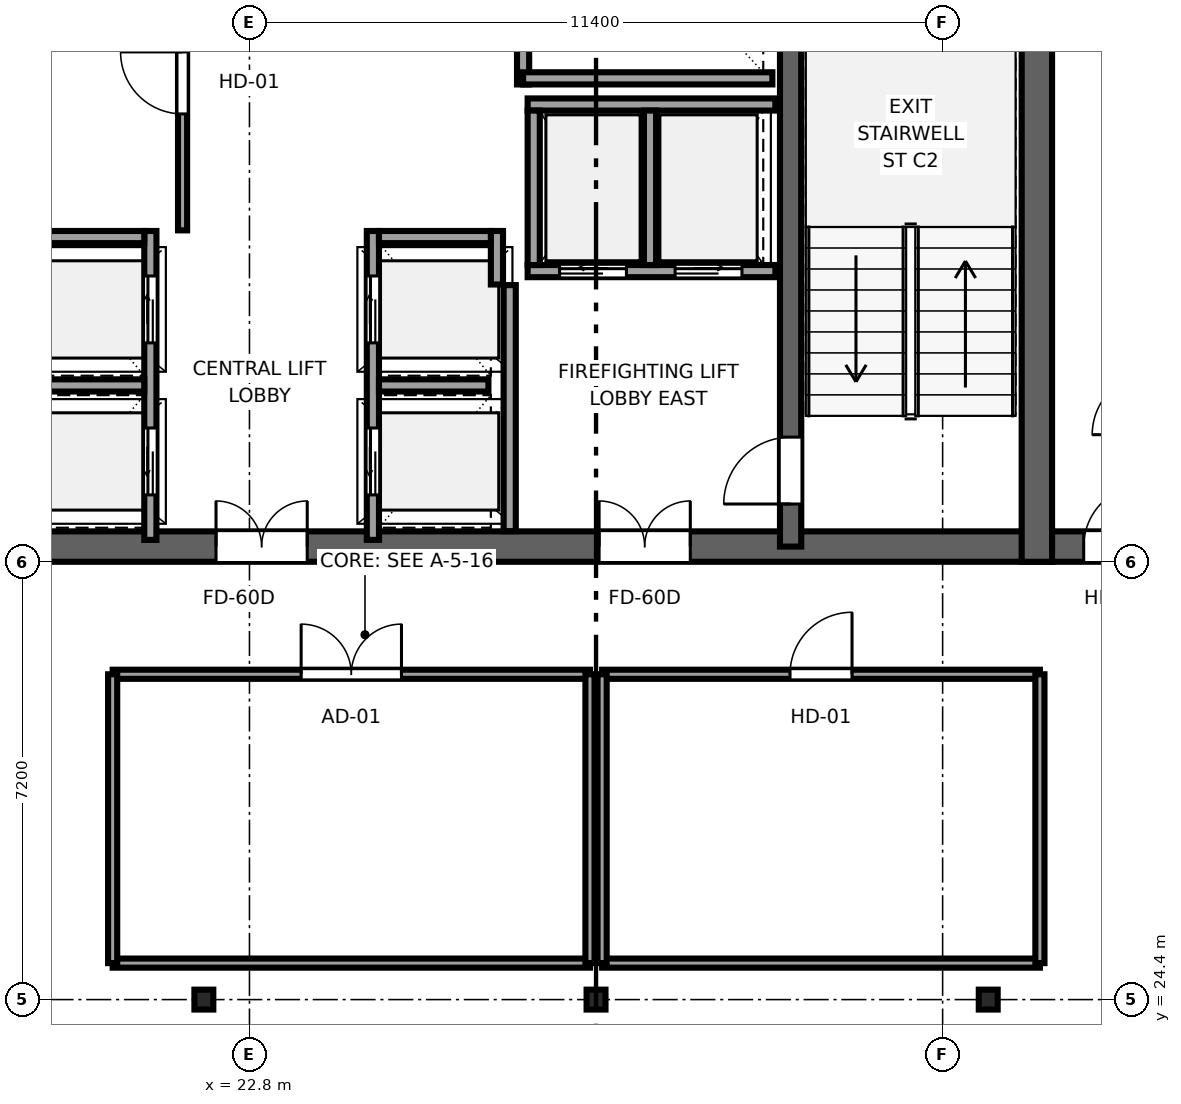
"""IFC4 building model, lengths in metres.
Left out: names, types, materials, properties, quantities, classifications, styles, units other than length and angle.
Written with IfcOpenShell. Run it as: python <this file> out.ifc"""

import sys

from ifc_helpers import new_model, si_unit, direction, frame, frame_2d, origin, origin_2d, place, context, subcontext, project, spatial, rectangle, i_section, extrude, source, transform, mapped, element, fill, save


model = new_model("IFC4")
c1 = context("Model", 3, precision=1e-05, world=origin(), true_north=direction((0.0, 1.0)))
c2 = subcontext(c1, "Body", "Model", "MODEL_VIEW")
j1 = project(units=[si_unit("LENGTHUNIT", "METRE"), si_unit("PLANEANGLEUNIT", "RADIAN")], contexts=[c1])
p1 = place(None, origin())
s1 = spatial("IfcSite", under=j1, at=p1, CompositionType="ELEMENT")
p2 = place(p1, origin())
s2 = spatial("IfcBuilding", under=s1, at=p2, CompositionType="ELEMENT")
p3 = place(p2, frame((0.0, 0.0, 231.0)))
s3 = spatial("IfcBuildingStorey", under=s2, at=p3, CompositionType="ELEMENT", Elevation=231.0)
p4 = place(p3, frame((10.0, 31.85, 0.0), z_axis=(0.0, 0.0, 1.0), x_axis=(1.0, 0.0, 0.0)))
e1 = element("IfcWall", 1, at=p4, inside=s3, PredefinedType="SHEAR", context=c2, shape_type="SweptSolid", body=[
    extrude(rectangle(XDim=26.0, YDim=0.5, at=frame_2d((13.0, 0.0))), origin(), (0.0, 0.0, 1.0), 3.55),
])
p5 = place(p4, frame((7.45, 0.0, 0.0), z_axis=(0.0, 0.0, 1.0), x_axis=(-1.0, 0.0, 0.0)))
e2 = element("IfcOpeningElement", 2, at=p5, cuts=e1, PredefinedType="OPENING", context=c2, shape_type="SweptSolid", body=[
    extrude(rectangle(XDim=1.5, YDim=2.04, at=frame_2d((0.75, 1.02))), frame((0.0, 0.26, 0.0), z_axis=(0.0, -1.0, 0.0), x_axis=(1.0, 0.0, 0.0)), (0.0, 0.0, 1.0), 0.52),
])
p6 = place(p4, frame((13.75, 0.0, 0.0), z_axis=(0.0, 0.0, 1.0), x_axis=(-1.0, 0.0, 0.0)))
e3 = element("IfcOpeningElement", 3, at=p6, cuts=e1, PredefinedType="OPENING", context=c2, shape_type="SweptSolid", body=[
    extrude(rectangle(XDim=1.5, YDim=2.04, at=frame_2d((0.75, 1.02))), frame((0.0, 0.26, 0.0), z_axis=(0.0, -1.0, 0.0), x_axis=(1.0, 0.0, 0.0)), (0.0, 0.0, 1.0), 0.52),
])
p7 = place(p4, frame((20.05, 0.0, 0.0), z_axis=(0.0, 0.0, 1.0), x_axis=(-1.0, 0.0, 0.0)))
e4 = element("IfcOpeningElement", 4, at=p7, cuts=e1, PredefinedType="OPENING", context=c2, shape_type="SweptSolid", body=[
    extrude(rectangle(XDim=1.5, YDim=2.04, at=frame_2d((0.75, 1.02))), frame((0.0, 0.26, 0.0), z_axis=(0.0, -1.0, 0.0), x_axis=(1.0, 0.0, 0.0)), (0.0, 0.0, 1.0), 0.52),
])
p8 = place(p3, frame((35.75, 31.6, 0.0), z_axis=(0.0, 0.0, 1.0), x_axis=(0.0, 1.0, 0.0)))
e5 = element("IfcWall", 5, at=p8, inside=s3, PredefinedType="SHEAR", context=c2, shape_type="SweptSolid", body=[
    extrude(rectangle(XDim=13.6, YDim=0.5, at=frame_2d((6.8, 0.0))), origin(), (0.0, 0.0, 1.0), 3.55),
])
p9 = place(p3, frame((31.7, 31.85, 0.0), z_axis=(0.0, 0.0, 1.0), x_axis=(0.0, 1.0, 0.0)))
e6 = element("IfcWall", 6, at=p9, inside=s3, PredefinedType="SHEAR", context=c2, shape_type="SweptSolid", body=[
    extrude(rectangle(XDim=13.1, YDim=0.35, at=frame_2d((6.55, 0.0))), origin(), (0.0, 0.0, 1.0), 3.55),
])
p10 = place(p9, frame((1.8, 0.0, 0.0), z_axis=(0.0, 0.0, 1.0), x_axis=(-1.0, 0.0, 0.0)))
e7 = element("IfcOpeningElement", 7, at=p10, cuts=e6, PredefinedType="OPENING", context=c2, shape_type="SweptSolid", body=[
    extrude(rectangle(XDim=1.1, YDim=2.12, at=frame_2d((0.55, 1.06))), frame((0.0, 0.185, 0.0), z_axis=(0.0, -1.0, 0.0), x_axis=(1.0, 0.0, 0.0)), (0.0, 0.0, 1.0), 0.37),
])
p11 = place(p3, frame((36.0, 31.85, 0.0), z_axis=(0.0, 0.0, 1.0), x_axis=(1.0, 0.0, 0.0)))
e8 = element("IfcWall", 8, at=p11, inside=s3, PredefinedType="SHEAR", context=c2, shape_type="SweptSolid", body=[
    extrude(rectangle(XDim=3.8, YDim=0.5, at=frame_2d((1.9, 0.0))), origin(), (0.0, 0.0, 1.0), 3.55),
])
p12 = place(p11, frame((1.54, 0.0, 0.0), z_axis=(0.0, 0.0, 1.0), x_axis=(-1.0, 0.0, 0.0)))
e9 = element("IfcOpeningElement", 9, at=p12, cuts=e8, PredefinedType="OPENING", context=c2, shape_type="SweptSolid", body=[
    extrude(rectangle(XDim=1.02, YDim=2.03, at=frame_2d((0.51, 1.015))), frame((0.0, 0.26, 0.0), z_axis=(0.0, -1.0, 0.0), x_axis=(1.0, 0.0, 0.0)), (0.0, 0.0, 1.0), 0.52),
])
m1 = source(origin(), c2, "Body", "SweptSolid", [
    extrude(i_section(OverallWidth=0.311, OverallDepth=0.327, WebThickness=0.016, FlangeThickness=0.025, FilletRadius=0.017, at=origin_2d()), origin(), (0.0, 0.0, 1.0), 3.55),
])
for number, where, z_axis, x_axis in (
    (10, (22.05, 24.4, 0.0), (0.0, 0.0, 1.0), (1.0, 0.0, 0.0)),
    (11, (28.5, 24.4, 0.0), (0.0, 0.0, 1.0), (1.0, 0.0, 0.0)),
    (12, (34.95, 24.4, 0.0), (0.0, 0.0, 1.0), (1.0, 0.0, 0.0)),
):
    element("IfcColumn", number, at=place(p3, frame(where, z_axis=z_axis, x_axis=x_axis)), inside=s3, PredefinedType="COLUMN", context=c2, shape_type="MappedRepresentation", body=[
        mapped(m1, transform((0.0, 0.0, 0.0), x_axis=(1.0, 0.0, 0.0), y_axis=(0.0, 1.0, 0.0), z_axis=(0.0, 0.0, 1.0), scale=1.0)),
    ])
p13 = place(p3, frame((27.3, 39.45, 0.0), z_axis=(0.0, 0.0, 1.0), x_axis=(0.0, 1.0, 0.0)))
e13 = element("IfcWall", 13, at=p13, inside=s3, PredefinedType="SOLIDWALL", context=c2, shape_type="SweptSolid", body=[
    extrude(rectangle(XDim=4.4, YDim=0.2, at=frame_2d((2.2, 0.0))), origin(), (0.0, 0.0, 1.0), 3.37),
])
p14 = place(p3, frame((27.3, 39.55, 0.0), z_axis=(0.0, 0.0, 1.0), x_axis=(1.0, 0.0, 0.0)))
e14 = element("IfcWall", 14, at=p14, inside=s3, PredefinedType="SOLIDWALL", context=c2, shape_type="SweptSolid", body=[
    extrude(rectangle(XDim=4.1, YDim=0.2, at=frame_2d((2.05, 0.0))), origin(), (0.0, 0.0, 1.0), 3.37),
])
p15 = place(p3, frame((27.08, 32.104, 0.0), z_axis=(0.0, 0.0, 1.0), x_axis=(0.0, 1.0, 0.0)))
e15 = element("IfcWall", 15, at=p15, inside=s3, PredefinedType="SOLIDWALL", context=c2, shape_type="SweptSolid", body=[
    extrude(rectangle(XDim=4.046, YDim=0.2, at=frame_2d((2.023, 0.0))), origin(), (0.0, 0.0, 1.0), 3.37),
])
p16 = place(p3, frame((21.17, 31.96, 0.0), z_axis=(0.0, 0.0, 1.0), x_axis=(0.0, 1.0, 0.0)))
e16 = element("IfcWall", 16, at=p16, inside=s3, PredefinedType="SOLIDWALL", context=c2, shape_type="SweptSolid", body=[
    extrude(rectangle(XDim=5.08, YDim=0.2, at=frame_2d((2.54, 0.0))), origin(), (0.0, 0.0, 1.0), 3.37),
])
p17 = place(p16, frame((0.74, 0.0, 0.0)))
e17 = element("IfcOpeningElement", 17, at=p17, cuts=e16, PredefinedType="OPENING", context=c2, shape_type="SweptSolid", body=[
    extrude(rectangle(XDim=1.1, YDim=2.12, at=frame_2d((0.55, 1.06))), frame((0.0, 0.11, 0.0), z_axis=(0.0, -1.0, 0.0), x_axis=(1.0, 0.0, 0.0)), (0.0, 0.0, 1.0), 0.22),
])
p18 = place(p16, frame((3.24, 0.0, 0.0)))
e18 = element("IfcOpeningElement", 18, at=p18, cuts=e16, PredefinedType="OPENING", context=c2, shape_type="SweptSolid", body=[
    extrude(rectangle(XDim=1.1, YDim=2.12, at=frame_2d((0.55, 1.06))), frame((0.0, 0.11, 0.0), z_axis=(0.0, -1.0, 0.0), x_axis=(1.0, 0.0, 0.0)), (0.0, 0.0, 1.0), 0.22),
])
p19 = place(p3, frame((19.23, 36.94, 0.0), z_axis=(0.0, 0.0, 1.0), x_axis=(1.0, 0.0, 0.0)))
e19 = element("IfcWall", 19, at=p19, inside=s3, PredefinedType="SOLIDWALL", context=c2, shape_type="SweptSolid", body=[
    extrude(rectangle(XDim=1.84, YDim=0.2, at=frame_2d((0.92, 0.0))), origin(), (0.0, 0.0, 1.0), 3.37),
])
p20 = place(p3, frame((19.27, 34.5, 0.0), z_axis=(0.0, 0.0, 1.0), x_axis=(1.0, 0.0, 0.0)))
e20 = element("IfcWall", 20, at=p20, inside=s3, PredefinedType="SOLIDWALL", context=c2, shape_type="SweptSolid", body=[
    extrude(rectangle(XDim=1.8, YDim=0.2, at=frame_2d((0.9, 0.0))), origin(), (0.0, 0.0, 1.0), 3.37),
])
p21 = place(p3, frame((27.375, 36.38, 0.0), z_axis=(0.0, 0.0, 1.0), x_axis=(1.0, 0.0, 0.0)))
e21 = element("IfcWall", 21, at=p21, inside=s3, PredefinedType="SOLIDWALL", context=c2, shape_type="SweptSolid", body=[
    extrude(rectangle(XDim=4.075, YDim=0.2, at=frame_2d((2.038, 0.0))), origin(), (0.0, 0.0, 1.0), 3.37),
])
p22 = place(p21, frame((0.525, 0.0, 0.0)))
e22 = element("IfcOpeningElement", 22, at=p22, cuts=e21, PredefinedType="OPENING", context=c2, shape_type="SweptSolid", body=[
    extrude(rectangle(XDim=1.1, YDim=2.12, at=frame_2d((0.55, 1.06))), frame((0.0, 0.11, 0.0), z_axis=(0.0, -1.0, 0.0), x_axis=(1.0, 0.0, 0.0)), (0.0, 0.0, 1.0), 0.22),
])
p23 = place(p21, frame((2.425, 0.0, 0.0)))
e23 = element("IfcOpeningElement", 23, at=p23, cuts=e21, PredefinedType="OPENING", context=c2, shape_type="SweptSolid", body=[
    extrude(rectangle(XDim=1.1, YDim=2.12, at=frame_2d((0.55, 1.06))), frame((0.0, 0.11, 0.0), z_axis=(0.0, -1.0, 0.0), x_axis=(1.0, 0.0, 0.0)), (0.0, 0.0, 1.0), 0.22),
])
p24 = place(p3, frame((27.375, 39.12, 0.0), z_axis=(0.0, 0.0, 1.0), x_axis=(1.0, 0.0, 0.0)))
e24 = element("IfcWall", 24, at=p24, inside=s3, PredefinedType="SOLIDWALL", context=c2, shape_type="SweptSolid", body=[
    extrude(rectangle(XDim=4.075, YDim=0.2, at=frame_2d((2.038, 0.0))), origin(), (0.0, 0.0, 1.0), 3.37),
])
for number, where, z_axis, x_axis in (
    (25, (27.475, 36.48, 0.0), (0.0, 0.0, 1.0), (0.0, 1.0, 0.0)),
    (26, (29.387, 36.48, 0.0), (0.0, 0.0, 1.0), (0.0, 1.0, 0.0)),
):
    element("IfcWall", number, at=place(p3, frame(where, z_axis=z_axis, x_axis=x_axis)), inside=s3, PredefinedType="SOLIDWALL", context=c2, shape_type="SweptSolid", body=[
        extrude(rectangle(XDim=2.54, YDim=0.2, at=frame_2d((1.27, 0.0))), origin(), (0.0, 0.0, 1.0), 3.37),
    ])
p25 = place(p3, frame((24.83, 31.96, 0.0), z_axis=(0.0, 0.0, 1.0), x_axis=(0.0, 1.0, 0.0)))
e27 = element("IfcWall", 27, at=p25, inside=s3, PredefinedType="SOLIDWALL", context=c2, shape_type="SweptSolid", body=[
    extrude(rectangle(XDim=5.08, YDim=0.2, at=frame_2d((2.54, 0.0))), origin(), (0.0, 0.0, 1.0), 3.37),
])
p26 = place(p25, frame((0.74, 0.0, 0.0)))
e28 = element("IfcOpeningElement", 28, at=p26, cuts=e27, PredefinedType="OPENING", context=c2, shape_type="SweptSolid", body=[
    extrude(rectangle(XDim=1.1, YDim=2.12, at=frame_2d((0.55, 1.06))), frame((0.0, 0.11, 0.0), z_axis=(0.0, -1.0, 0.0), x_axis=(1.0, 0.0, 0.0)), (0.0, 0.0, 1.0), 0.22),
])
p27 = place(p25, frame((3.24, 0.0, 0.0)))
e29 = element("IfcOpeningElement", 29, at=p27, cuts=e27, PredefinedType="OPENING", context=c2, shape_type="SweptSolid", body=[
    extrude(rectangle(XDim=1.1, YDim=2.12, at=frame_2d((0.55, 1.06))), frame((0.0, 0.11, 0.0), z_axis=(0.0, -1.0, 0.0), x_axis=(1.0, 0.0, 0.0)), (0.0, 0.0, 1.0), 0.22),
])
p28 = place(p3, frame((26.87, 36.16, 0.0), z_axis=(0.0, 0.0, 1.0), x_axis=(0.0, 1.0, 0.0)))
e30 = element("IfcWall", 30, at=p28, inside=s3, PredefinedType="SOLIDWALL", context=c2, shape_type="SweptSolid", body=[
    extrude(rectangle(XDim=0.88, YDim=0.2, at=frame_2d((0.44, 0.0))), origin(), (0.0, 0.0, 1.0), 3.37),
])
p29 = place(p3, frame((24.93, 36.94, 0.0), z_axis=(0.0, 0.0, 1.0), x_axis=(1.0, 0.0, 0.0)))
e31 = element("IfcWall", 31, at=p29, inside=s3, PredefinedType="SOLIDWALL", context=c2, shape_type="SweptSolid", body=[
    extrude(rectangle(XDim=1.84, YDim=0.2, at=frame_2d((0.92, 0.0))), origin(), (0.0, 0.0, 1.0), 3.37),
])
p30 = place(p3, frame((24.93, 34.5, 0.0), z_axis=(0.0, 0.0, 1.0), x_axis=(1.0, 0.0, 0.0)))
e32 = element("IfcWall", 32, at=p30, inside=s3, PredefinedType="SOLIDWALL", context=c2, shape_type="SweptSolid", body=[
    extrude(rectangle(XDim=1.8, YDim=0.2, at=frame_2d((0.9, 0.0))), origin(), (0.0, 0.0, 1.0), 3.37),
])
p31 = place(p3, frame((21.7, 37.05, 0.0), z_axis=(0.0, 0.0, 1.0), x_axis=(0.0, 1.0, 0.0)))
e33 = element("IfcWall", 33, at=p31, inside=s3, PredefinedType="PARTITIONING", context=c2, shape_type="SweptSolid", body=[
    extrude(rectangle(XDim=4.85, YDim=0.15, at=frame_2d((2.425, 0.0))), origin(), (0.0, 0.0, 1.0), 3.37),
])
p32 = place(p31, frame((1.915, 0.0, 0.0)))
e34 = element("IfcOpeningElement", 34, at=p32, cuts=e33, PredefinedType="OPENING", context=c2, shape_type="SweptSolid", body=[
    extrude(rectangle(XDim=1.02, YDim=2.03, at=frame_2d((0.51, 1.015))), frame((0.0, 0.085, 0.0), z_axis=(0.0, -1.0, 0.0), x_axis=(1.0, 0.0, 0.0)), (0.0, 0.0, 1.0), 0.17),
])
p33 = place(p3, frame((20.55, 25.0, 0.0), z_axis=(0.0, 0.0, 1.0), x_axis=(1.0, 0.0, 0.0)))
e35 = element("IfcWall", 35, at=p33, inside=s3, PredefinedType="PARTITIONING", context=c2, shape_type="SweptSolid", body=[
    extrude(rectangle(XDim=7.85, YDim=0.15, at=frame_2d((3.925, 0.0))), origin(), (0.0, 0.0, 1.0), 3.37),
])
p34 = place(p3, frame((20.55, 29.75, 0.0), z_axis=(0.0, 0.0, 1.0), x_axis=(1.0, 0.0, 0.0)))
e36 = element("IfcWall", 36, at=p34, inside=s3, PredefinedType="PARTITIONING", context=c2, shape_type="SweptSolid", body=[
    extrude(rectangle(XDim=7.85, YDim=0.15, at=frame_2d((3.925, 0.0))), origin(), (0.0, 0.0, 1.0), 3.37),
])
p35 = place(p34, frame((3.1, 0.0, 0.0)))
e37 = element("IfcOpeningElement", 37, at=p35, cuts=e36, PredefinedType="OPENING", context=c2, shape_type="SweptSolid", body=[
    extrude(rectangle(XDim=1.65, YDim=2.15, at=frame_2d((0.825, 1.075))), frame((0.0, 0.085, 0.0), z_axis=(0.0, -1.0, 0.0), x_axis=(1.0, 0.0, 0.0)), (0.0, 0.0, 1.0), 0.17),
])
p36 = place(p3, frame((20.55, 25.0, 0.0), z_axis=(0.0, 0.0, 1.0), x_axis=(0.0, 1.0, 0.0)))
e38 = element("IfcWall", 38, at=p36, inside=s3, PredefinedType="PARTITIONING", context=c2, shape_type="SweptSolid", body=[
    extrude(rectangle(XDim=4.75, YDim=0.15, at=frame_2d((2.375, 0.0))), origin(), (0.0, 0.0, 1.0), 3.37),
])
p37 = place(p3, frame((28.4, 25.0, 0.0), z_axis=(0.0, 0.0, 1.0), x_axis=(0.0, 1.0, 0.0)))
e39 = element("IfcWall", 39, at=p37, inside=s3, PredefinedType="PARTITIONING", context=c2, shape_type="SweptSolid", body=[
    extrude(rectangle(XDim=4.75, YDim=0.15, at=frame_2d((2.375, 0.0))), origin(), (0.0, 0.0, 1.0), 2.758),
])
p38 = place(p3, frame((28.6, 25.0, 0.0), z_axis=(0.0, 0.0, 1.0), x_axis=(1.0, 0.0, 0.0)))
e40 = element("IfcWall", 40, at=p38, inside=s3, PredefinedType="PARTITIONING", context=c2, shape_type="SweptSolid", body=[
    extrude(rectangle(XDim=7.2, YDim=0.15, at=frame_2d((3.6, 0.0))), origin(), (0.0, 0.0, 1.0), 3.37),
])
p39 = place(p3, frame((28.6, 29.75, 0.0), z_axis=(0.0, 0.0, 1.0), x_axis=(1.0, 0.0, 0.0)))
e41 = element("IfcWall", 41, at=p39, inside=s3, PredefinedType="PARTITIONING", context=c2, shape_type="SweptSolid", body=[
    extrude(rectangle(XDim=7.2, YDim=0.15, at=frame_2d((3.6, 0.0))), origin(), (0.0, 0.0, 1.0), 3.37),
])
p40 = place(p39, frame((3.09, 0.0, 0.0)))
e42 = element("IfcOpeningElement", 42, at=p40, cuts=e41, PredefinedType="OPENING", context=c2, shape_type="SweptSolid", body=[
    extrude(rectangle(XDim=1.02, YDim=2.03, at=frame_2d((0.51, 1.015))), frame((0.0, 0.085, 0.0), z_axis=(0.0, -1.0, 0.0), x_axis=(1.0, 0.0, 0.0)), (0.0, 0.0, 1.0), 0.17),
])
p41 = place(p3, frame((28.6, 25.0, 0.0), z_axis=(0.0, 0.0, 1.0), x_axis=(0.0, 1.0, 0.0)))
e43 = element("IfcWall", 43, at=p41, inside=s3, PredefinedType="PARTITIONING", context=c2, shape_type="SweptSolid", body=[
    extrude(rectangle(XDim=4.75, YDim=0.15, at=frame_2d((2.375, 0.0))), origin(), (0.0, 0.0, 1.0), 2.758),
])
p42 = place(p3, frame((35.8, 25.0, 0.0), z_axis=(0.0, 0.0, 1.0), x_axis=(0.0, 1.0, 0.0)))
e44 = element("IfcWall", 44, at=p42, inside=s3, PredefinedType="PARTITIONING", context=c2, shape_type="SweptSolid", body=[
    extrude(rectangle(XDim=4.75, YDim=0.15, at=frame_2d((2.375, 0.0))), origin(), (0.0, 0.0, 1.0), 3.37),
])
m2 = source(origin(), c2, "Body", "SweptSolid", [
    extrude(rectangle(XDim=1.1, YDim=2.12, at=frame_2d((0.55, 1.06))), frame((0.0, 0.025, 0.0), z_axis=(0.0, -1.0, 0.0), x_axis=(1.0, 0.0, 0.0)), (0.0, 0.0, 1.0), 0.05),
])
p43 = place(p10, origin())
e45 = element("IfcDoor", 45, at=p43, inside=s3, OperationType="SINGLE_SWING_LEFT", PredefinedType="DOOR", context=c2, shape_type="MappedRepresentation", body=[
    mapped(m2, transform((0.0, 0.0, 0.0), x_axis=(1.0, 0.0, 0.0), y_axis=(0.0, 1.0, 0.0), z_axis=(0.0, 0.0, 1.0), scale=1.0)),
])
fill(e7, e45)
m3 = source(origin(), c2, "Body", "SweptSolid", [
    extrude(rectangle(XDim=1.5, YDim=2.04, at=frame_2d((0.75, 1.02))), frame((0.0, 0.025, 0.0), z_axis=(0.0, -1.0, 0.0), x_axis=(1.0, 0.0, 0.0)), (0.0, 0.0, 1.0), 0.05),
])
p44 = place(p6, origin())
e46 = element("IfcDoor", 46, at=p44, inside=s3, OperationType="DOUBLE_DOOR_SINGLE_SWING", PredefinedType="DOOR", context=c2, shape_type="MappedRepresentation", body=[
    mapped(m3, transform((0.0, 0.0, 0.0), x_axis=(1.0, 0.0, 0.0), y_axis=(0.0, 1.0, 0.0), z_axis=(0.0, 0.0, 1.0), scale=1.0)),
])
fill(e3, e46)
p45 = place(p7, origin())
e47 = element("IfcDoor", 47, at=p45, inside=s3, OperationType="DOUBLE_DOOR_SINGLE_SWING", PredefinedType="DOOR", context=c2, shape_type="MappedRepresentation", body=[
    mapped(m3, transform((0.0, 0.0, 0.0), x_axis=(1.0, 0.0, 0.0), y_axis=(0.0, 1.0, 0.0), z_axis=(0.0, 0.0, 1.0), scale=1.0)),
])
fill(e4, e47)
m4 = source(origin(), c2, "Body", "SweptSolid", [
    extrude(rectangle(XDim=1.02, YDim=2.03, at=frame_2d((0.51, 1.015))), frame((0.0, 0.025, 0.0), z_axis=(0.0, -1.0, 0.0), x_axis=(1.0, 0.0, 0.0)), (0.0, 0.0, 1.0), 0.05),
])
p46 = place(p12, origin())
e48 = element("IfcDoor", 48, at=p46, inside=s3, OperationType="SINGLE_SWING_RIGHT", PredefinedType="DOOR", context=c2, shape_type="MappedRepresentation", body=[
    mapped(m4, transform((0.0, 0.0, 0.0), x_axis=(1.0, 0.0, 0.0), y_axis=(0.0, 1.0, 0.0), z_axis=(0.0, 0.0, 1.0), scale=1.0)),
])
fill(e9, e48)
m5 = source(origin(), c2, "Body", "SweptSolid", [
    extrude(rectangle(XDim=1.1, YDim=2.12, at=frame_2d((0.55, 1.06))), frame((0.0, 0.025, 0.0), z_axis=(0.0, -1.0, 0.0), x_axis=(1.0, 0.0, 0.0)), (0.0, 0.0, 1.0), 0.05),
])
p47 = place(p17, origin())
e49 = element("IfcDoor", 49, at=p47, inside=s3, OperationType="SLIDING_TO_LEFT", PredefinedType="DOOR", context=c2, shape_type="MappedRepresentation", body=[
    mapped(m5, transform((0.0, 0.0, 0.0), x_axis=(1.0, 0.0, 0.0), y_axis=(0.0, 1.0, 0.0), z_axis=(0.0, 0.0, 1.0), scale=1.0)),
])
fill(e17, e49)
p48 = place(p18, origin())
e50 = element("IfcDoor", 50, at=p48, inside=s3, OperationType="SLIDING_TO_RIGHT", PredefinedType="DOOR", context=c2, shape_type="MappedRepresentation", body=[
    mapped(m5, transform((0.0, 0.0, 0.0), x_axis=(1.0, 0.0, 0.0), y_axis=(0.0, 1.0, 0.0), z_axis=(0.0, 0.0, 1.0), scale=1.0)),
])
fill(e18, e50)
p49 = place(p22, origin())
e51 = element("IfcDoor", 51, at=p49, inside=s3, OperationType="SLIDING_TO_LEFT", PredefinedType="DOOR", context=c2, shape_type="MappedRepresentation", body=[
    mapped(m5, transform((0.0, 0.0, 0.0), x_axis=(1.0, 0.0, 0.0), y_axis=(0.0, 1.0, 0.0), z_axis=(0.0, 0.0, 1.0), scale=1.0)),
])
fill(e22, e51)
p50 = place(p23, origin())
e52 = element("IfcDoor", 52, at=p50, inside=s3, OperationType="SLIDING_TO_RIGHT", PredefinedType="DOOR", context=c2, shape_type="MappedRepresentation", body=[
    mapped(m5, transform((0.0, 0.0, 0.0), x_axis=(1.0, 0.0, 0.0), y_axis=(0.0, 1.0, 0.0), z_axis=(0.0, 0.0, 1.0), scale=1.0)),
])
fill(e23, e52)
p51 = place(p26, origin())
e53 = element("IfcDoor", 53, at=p51, inside=s3, OperationType="SLIDING_TO_LEFT", PredefinedType="DOOR", context=c2, shape_type="MappedRepresentation", body=[
    mapped(m5, transform((0.0, 0.0, 0.0), x_axis=(1.0, 0.0, 0.0), y_axis=(0.0, 1.0, 0.0), z_axis=(0.0, 0.0, 1.0), scale=1.0)),
])
fill(e28, e53)
p52 = place(p27, origin())
e54 = element("IfcDoor", 54, at=p52, inside=s3, OperationType="SLIDING_TO_RIGHT", PredefinedType="DOOR", context=c2, shape_type="MappedRepresentation", body=[
    mapped(m5, transform((0.0, 0.0, 0.0), x_axis=(1.0, 0.0, 0.0), y_axis=(0.0, 1.0, 0.0), z_axis=(0.0, 0.0, 1.0), scale=1.0)),
])
fill(e29, e54)
p53 = place(p32, origin())
e55 = element("IfcDoor", 55, at=p53, inside=s3, OperationType="SINGLE_SWING_RIGHT", PredefinedType="DOOR", context=c2, shape_type="MappedRepresentation", body=[
    mapped(m4, transform((0.0, 0.0, 0.0), x_axis=(1.0, 0.0, 0.0), y_axis=(0.0, 1.0, 0.0), z_axis=(0.0, 0.0, 1.0), scale=1.0)),
])
fill(e34, e55)
m6 = source(origin(), c2, "Body", "SweptSolid", [
    extrude(rectangle(XDim=1.65, YDim=2.15, at=frame_2d((0.825, 1.075))), frame((0.0, 0.025, 0.0), z_axis=(0.0, -1.0, 0.0), x_axis=(1.0, 0.0, 0.0)), (0.0, 0.0, 1.0), 0.05),
])
p54 = place(p35, origin())
e56 = element("IfcDoor", 56, at=p54, inside=s3, OperationType="DOUBLE_DOOR_SINGLE_SWING", PredefinedType="DOOR", context=c2, shape_type="MappedRepresentation", body=[
    mapped(m6, transform((0.0, 0.0, 0.0), x_axis=(1.0, 0.0, 0.0), y_axis=(0.0, 1.0, 0.0), z_axis=(0.0, 0.0, 1.0), scale=1.0)),
])
fill(e37, e56)
p55 = place(p40, origin())
e57 = element("IfcDoor", 57, at=p55, inside=s3, OperationType="SINGLE_SWING_RIGHT", PredefinedType="DOOR", context=c2, shape_type="MappedRepresentation", body=[
    mapped(m4, transform((0.0, 0.0, 0.0), x_axis=(1.0, 0.0, 0.0), y_axis=(0.0, 1.0, 0.0), z_axis=(0.0, 0.0, 1.0), scale=1.0)),
])
fill(e42, e57)
save(model, sys.argv[1])
